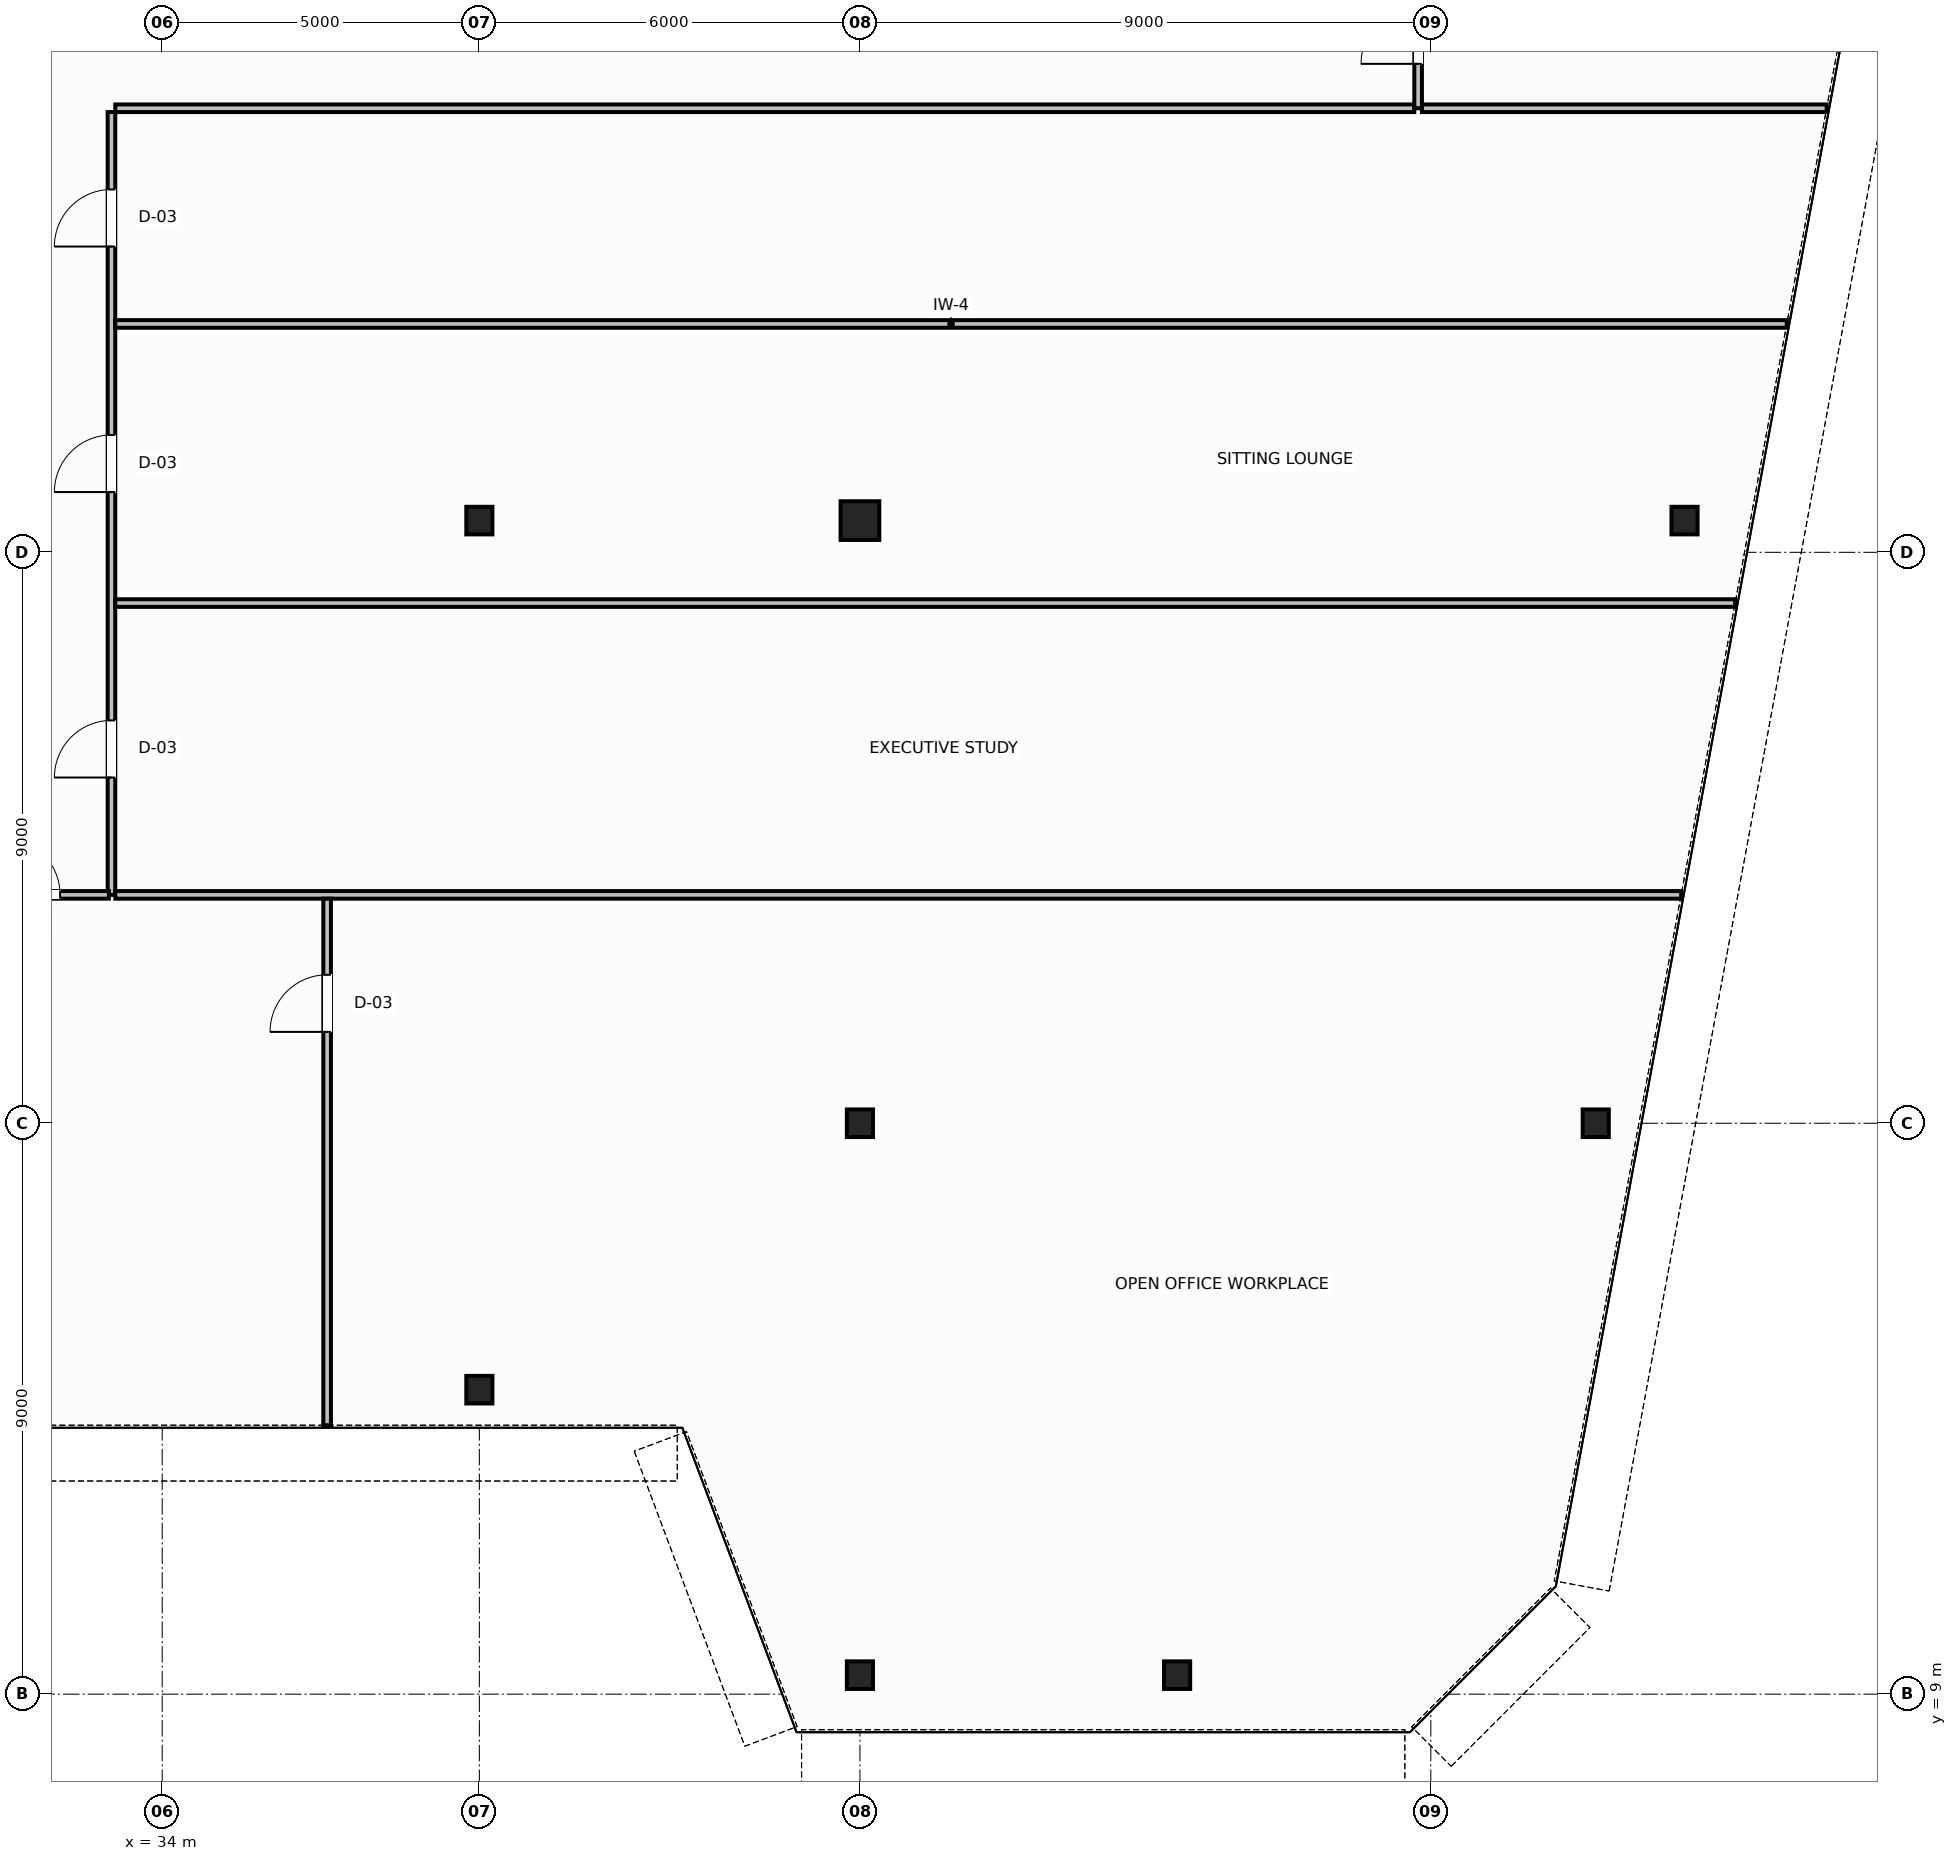
"""IFC4 building model, lengths in metres.
Left out: names, types, materials, properties, quantities, classifications, styles, units other than length and angle.
Written with IfcOpenShell. Run it as: python <this file> out.ifc"""

import sys

from ifc_helpers import new_model, si_unit, direction, frame, frame_2d, origin, origin_2d, place, context, subcontext, project, spatial, rectangle, hollow_circle, i_section, extrude, source, transform, mapped, element, fill, save


model = new_model("IFC4")
c1 = context("Model", 3, precision=1e-05, world=origin(), true_north=direction((0.0, 1.0)))
c2 = subcontext(c1, "Body", "Model", "MODEL_VIEW")
j1 = project(units=[si_unit("LENGTHUNIT", "METRE"), si_unit("PLANEANGLEUNIT", "RADIAN")], contexts=[c1])
p1 = place(None, origin())
s1 = spatial("IfcSite", under=j1, at=p1, CompositionType="ELEMENT")
p2 = place(p1, origin())
s2 = spatial("IfcBuilding", under=s1, at=p2, CompositionType="ELEMENT")
p3 = place(p2, frame((0.0, 0.0, 227.0)))
s3 = spatial("IfcBuildingStorey", under=s2, at=p3, CompositionType="ELEMENT", Elevation=227.0)
m1 = source(origin(), c2, "Body", "SweptSolid", [
    extrude(i_section(OverallWidth=0.412, OverallDepth=0.435, WebThickness=0.036, FlangeThickness=0.05, FilletRadius=0.015, at=origin_2d()), origin(), (0.0, 0.0, 1.0), 3.8),
])
for number, where, z_axis, x_axis in (
    (1, (58.0, 27.5, 0.0), (0.0, 0.0, 1.0), (1.0, 0.0, 0.0)),
    (2, (56.6, 18.0, 0.0), (0.0, 0.0, 1.0), (1.0, 0.0, 0.0)),
):
    element("IfcColumn", number, at=place(p3, frame(where, z_axis=z_axis, x_axis=x_axis)), inside=s3, PredefinedType="COLUMN", context=c2, shape_type="MappedRepresentation", body=[
        mapped(m1, transform((0.0, 0.0, 0.0), scale=1.0)),
    ])
m2 = source(origin(), c2, "Body", "SweptSolid", [
    extrude(i_section(OverallWidth=0.412, OverallDepth=0.435, WebThickness=0.036, FlangeThickness=0.05, FilletRadius=0.015, at=origin_2d()), origin(), (0.0, 0.0, 1.0), 3.8),
])
p4 = place(p3, frame((39.0, 27.5, 0.0), z_axis=(0.0, 0.0, 1.0), x_axis=(1.0, 0.0, 0.0)))
e3 = element("IfcColumn", 3, at=p4, inside=s3, PredefinedType="COLUMN", context=c2, shape_type="MappedRepresentation", body=[
    mapped(m2, transform((0.0, 0.0, 0.0), scale=1.0)),
])
m3 = source(origin(), c2, "Body", "SweptSolid", [
    extrude(hollow_circle(Radius=0.305, WallThickness=0.03, at=origin_2d()), origin(), (0.0, 0.0, 1.0), 3.8),
])
p5 = place(p3, frame((45.0, 27.5, 0.0), z_axis=(0.0, 0.0, 1.0), x_axis=(1.0, 0.0, 0.0)))
e4 = element("IfcColumn", 4, at=p5, inside=s3, PredefinedType="COLUMN", context=c2, shape_type="MappedRepresentation", body=[
    mapped(m3, transform((0.0, 0.0, 0.0), scale=1.0)),
])
for number, where, z_axis, x_axis in (
    (5, (45.0, 18.0, 0.0), (0.0, 0.0, 1.0), (1.0, 0.0, 0.0)),
    (6, (39.0, 13.8, 0.0), (0.0, 0.0, 1.0), (1.0, 0.0, 0.0)),
    (7, (45.0, 9.3, 0.0), (0.0, 0.0, 1.0), (1.0, 0.0, 0.0)),
    (8, (50.0, 9.3, 0.0), (0.0, 0.0, 1.0), (1.0, 0.0, 0.0)),
):
    element("IfcColumn", number, at=place(p3, frame(where, z_axis=z_axis, x_axis=x_axis)), inside=s3, PredefinedType="COLUMN", context=c2, shape_type="MappedRepresentation", body=[
        mapped(m2, transform((0.0, 0.0, 0.0), scale=1.0)),
    ])
p6 = place(p3, frame((33.26, 34.0, 0.0), z_axis=(0.0, 0.0, 1.0), x_axis=(1.0, 0.0, 0.0)))
e9 = element("IfcWall", 9, at=p6, inside=s3, PredefinedType="PARTITIONING", context=c2, shape_type="SweptSolid", body=[
    extrude(rectangle(XDim=20.48, YDim=0.12, at=frame_2d((10.24, 0.0))), origin(), (0.0, 0.0, 1.0), 3.58),
])
p7 = place(p3, frame((53.8, 34.0, 0.0), z_axis=(0.0, 0.0, 1.0), x_axis=(0.0, 1.0, 0.0)))
e10 = element("IfcWall", 10, at=p7, inside=s3, PredefinedType="PARTITIONING", context=c2, shape_type="SweptSolid", body=[
    extrude(rectangle(XDim=2.44, YDim=0.12, at=frame_2d((1.22, 0.0))), origin(), (0.0, 0.0, 1.0), 3.58),
])
p8 = place(p7, frame((0.7, 0.0, 0.0)))
e11 = element("IfcOpeningElement", 11, at=p8, cuts=e10, PredefinedType="OPENING", context=c2, shape_type="SweptSolid", body=[
    extrude(rectangle(XDim=0.9, YDim=2.15, at=frame_2d((0.45, 1.075))), frame((0.0, 0.07, 0.0), z_axis=(0.0, -1.0, 0.0), x_axis=(1.0, 0.0, 0.0)), (0.0, 0.0, 1.0), 0.14),
])
p9 = place(p3, frame((33.2, 21.6, 0.0), z_axis=(0.0, 0.0, 1.0), x_axis=(0.0, 1.0, 0.0)))
e12 = element("IfcWall", 12, at=p9, inside=s3, PredefinedType="PARTITIONING", context=c2, shape_type="SweptSolid", body=[
    extrude(rectangle(XDim=12.34, YDim=0.12, at=frame_2d((6.17, 0.0))), origin(), (0.0, 0.0, 1.0), 3.58),
])
p10 = place(p9, frame((1.85, 0.0, 0.0)))
e13 = element("IfcOpeningElement", 13, at=p10, cuts=e12, PredefinedType="OPENING", context=c2, shape_type="SweptSolid", body=[
    extrude(rectangle(XDim=0.9, YDim=2.15, at=frame_2d((0.45, 1.075))), frame((0.0, 0.07, 0.0), z_axis=(0.0, -1.0, 0.0), x_axis=(1.0, 0.0, 0.0)), (0.0, 0.0, 1.0), 0.14),
])
p11 = place(p9, frame((6.35, 0.0, 0.0)))
e14 = element("IfcOpeningElement", 14, at=p11, cuts=e12, PredefinedType="OPENING", context=c2, shape_type="SweptSolid", body=[
    extrude(rectangle(XDim=0.9, YDim=2.15, at=frame_2d((0.45, 1.075))), frame((0.0, 0.07, 0.0), z_axis=(0.0, -1.0, 0.0), x_axis=(1.0, 0.0, 0.0)), (0.0, 0.0, 1.0), 0.14),
])
p12 = place(p9, frame((10.22, 0.0, 0.0)))
e15 = element("IfcOpeningElement", 15, at=p12, cuts=e12, PredefinedType="OPENING", context=c2, shape_type="SweptSolid", body=[
    extrude(rectangle(XDim=0.9, YDim=2.15, at=frame_2d((0.45, 1.075))), frame((0.0, 0.07, 0.0), z_axis=(0.0, -1.0, 0.0), x_axis=(1.0, 0.0, 0.0)), (0.0, 0.0, 1.0), 0.14),
])
p13 = place(p3, frame((30.84, 21.6, 0.0), z_axis=(0.0, 0.0, 1.0), x_axis=(1.0, 0.0, 0.0)))
e16 = element("IfcWall", 16, at=p13, inside=s3, PredefinedType="PARTITIONING", context=c2, shape_type="SweptSolid", body=[
    extrude(rectangle(XDim=2.32, YDim=0.12, at=frame_2d((1.16, 0.0))), origin(), (0.0, 0.0, 1.0), 3.58),
])
p14 = place(p13, frame((0.65, 0.0, 0.0)))
e17 = element("IfcOpeningElement", 17, at=p14, cuts=e16, PredefinedType="OPENING", context=c2, shape_type="SweptSolid", body=[
    extrude(rectangle(XDim=0.9, YDim=2.15, at=frame_2d((0.45, 1.075))), frame((0.0, 0.07, 0.0), z_axis=(0.0, -1.0, 0.0), x_axis=(1.0, 0.0, 0.0)), (0.0, 0.0, 1.0), 0.14),
])
p15 = place(p3, frame((53.86, 34.0, 0.0), z_axis=(0.0, 0.0, 1.0), x_axis=(1.0, 0.0, 0.0)))
e18 = element("IfcWall", 18, at=p15, inside=s3, PredefinedType="PARTITIONING", context=c2, shape_type="SweptSolid", body=[
    extrude(rectangle(XDim=6.381, YDim=0.12, at=frame_2d((3.19, 0.0))), origin(), (0.0, 0.0, 1.0), 3.58),
])
p16 = place(p3, frame((33.26, 26.2, 0.0), z_axis=(0.0, 0.0, 1.0), x_axis=(1.0, 0.0, 0.0)))
e19 = element("IfcWall", 19, at=p16, inside=s3, PredefinedType="PARTITIONING", context=c2, shape_type="SweptSolid", body=[
    extrude(rectangle(XDim=25.538, YDim=0.12, at=frame_2d((12.769, 0.0))), origin(), (0.0, 0.0, 1.0), 3.58),
])
p17 = place(p3, frame((33.26, 30.6, 0.0), z_axis=(0.0, 0.0, 1.0), x_axis=(1.0, 0.0, 0.0)))
e20 = element("IfcWall", 20, at=p17, inside=s3, PredefinedType="PARTITIONING", context=c2, shape_type="SweptSolid", body=[
    extrude(rectangle(XDim=26.352, YDim=0.12, at=frame_2d((13.176, 0.0))), origin(), (0.0, 0.0, 1.0), 3.58),
])
p18 = place(p3, frame((33.26, 21.6, 0.0), z_axis=(0.0, 0.0, 1.0), x_axis=(1.0, 0.0, 0.0)))
e21 = element("IfcWall", 21, at=p18, inside=s3, PredefinedType="PARTITIONING", context=c2, shape_type="SweptSolid", body=[
    extrude(rectangle(XDim=24.687, YDim=0.12, at=frame_2d((12.344, 0.0))), origin(), (0.0, 0.0, 1.0), 3.58),
])
p19 = place(p3, frame((36.6, 13.24, 0.0), z_axis=(0.0, 0.0, 1.0), x_axis=(0.0, 1.0, 0.0)))
e22 = element("IfcWall", 22, at=p19, inside=s3, PredefinedType="PARTITIONING", context=c2, shape_type="SweptSolid", body=[
    extrude(rectangle(XDim=8.3, YDim=0.12, at=frame_2d((4.15, 0.0))), origin(), (0.0, 0.0, 1.0), 3.58),
])
p20 = place(p19, frame((6.2, 0.0, 0.0)))
e23 = element("IfcOpeningElement", 23, at=p20, cuts=e22, PredefinedType="OPENING", context=c2, shape_type="SweptSolid", body=[
    extrude(rectangle(XDim=0.9, YDim=2.15, at=frame_2d((0.45, 1.075))), frame((0.0, 0.07, 0.0), z_axis=(0.0, -1.0, 0.0), x_axis=(1.0, 0.0, 0.0)), (0.0, 0.0, 1.0), 0.14),
])
m4 = source(origin(), c2, "Body", "SweptSolid", [
    extrude(rectangle(XDim=0.9, YDim=2.15, at=frame_2d((0.45, 1.075))), frame((0.0, 0.025, 0.0), z_axis=(0.0, -1.0, 0.0), x_axis=(1.0, 0.0, 0.0)), (0.0, 0.0, 1.0), 0.05),
])
p21 = place(p8, origin())
e24 = element("IfcDoor", 24, at=p21, inside=s3, OperationType="SINGLE_SWING_RIGHT", PredefinedType="DOOR", context=c2, shape_type="MappedRepresentation", body=[
    mapped(m4, transform((0.0, 0.0, 0.0), scale=1.0)),
])
fill(e11, e24)
p22 = place(p10, origin())
e25 = element("IfcDoor", 25, at=p22, inside=s3, OperationType="SINGLE_SWING_RIGHT", PredefinedType="DOOR", context=c2, shape_type="MappedRepresentation", body=[
    mapped(m4, transform((0.0, 0.0, 0.0), scale=1.0)),
])
fill(e13, e25)
p23 = place(p11, origin())
e26 = element("IfcDoor", 26, at=p23, inside=s3, OperationType="SINGLE_SWING_LEFT", PredefinedType="DOOR", context=c2, shape_type="MappedRepresentation", body=[
    mapped(m4, transform((0.0, 0.0, 0.0), scale=1.0)),
])
fill(e14, e26)
p24 = place(p12, origin())
e27 = element("IfcDoor", 27, at=p24, inside=s3, OperationType="SINGLE_SWING_RIGHT", PredefinedType="DOOR", context=c2, shape_type="MappedRepresentation", body=[
    mapped(m4, transform((0.0, 0.0, 0.0), scale=1.0)),
])
fill(e15, e27)
p25 = place(p14, origin())
e28 = element("IfcDoor", 28, at=p25, inside=s3, OperationType="SINGLE_SWING_LEFT", PredefinedType="DOOR", context=c2, shape_type="MappedRepresentation", body=[
    mapped(m4, transform((0.0, 0.0, 0.0), scale=1.0)),
])
fill(e17, e28)
p26 = place(p20, origin())
e29 = element("IfcDoor", 29, at=p26, inside=s3, OperationType="SINGLE_SWING_RIGHT", PredefinedType="DOOR", context=c2, shape_type="MappedRepresentation", body=[
    mapped(m4, transform((0.0, 0.0, 0.0), scale=1.0)),
])
fill(e23, e29)
save(model, sys.argv[1])
